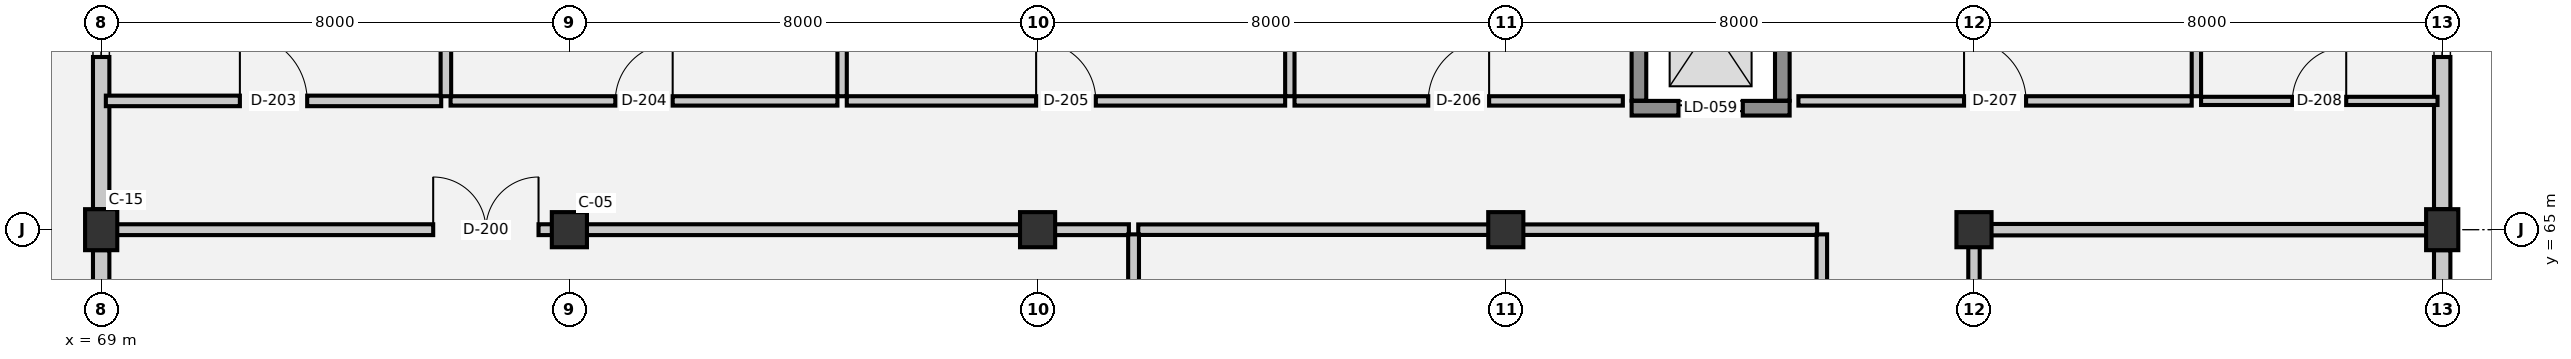
"""IFC4 building model, lengths in metres.
Left out: names, types, materials, properties, quantities, classifications, styles, units other than length and angle.
Written with IfcOpenShell. Run it as: python <this file> out.ifc"""

import sys

from ifc_helpers import new_model, si_unit, direction, frame, frame_2d, origin, origin_2d, place, context, subcontext, project, spatial, rectangle, extrude, element, fill, save


model = new_model("IFC4")
c1 = context("Model", 3, precision=1e-05, world=origin(), true_north=direction((0.0, 1.0)))
c2 = subcontext(c1, "Body", "Model", "MODEL_VIEW")
j1 = project(units=[si_unit("LENGTHUNIT", "METRE"), si_unit("PLANEANGLEUNIT", "RADIAN")], contexts=[c1])
p1 = place(None, origin())
s1 = spatial("IfcSite", under=j1, at=p1, CompositionType="ELEMENT")
p2 = place(p1, origin())
s2 = spatial("IfcBuilding", under=s1, at=p2, CompositionType="ELEMENT")
p3 = place(p2, frame((0.0, 0.0, 33.3)))
s3 = spatial("IfcBuildingStorey", under=s2, at=p3, CompositionType="ELEMENT", Elevation=33.3)
p4 = place(p3, frame((69.0, 65.0, 0.0), z_axis=(0.0, 0.0, 1.0), x_axis=(1.0, 0.0, 0.0)))
e1 = element("IfcColumn", 1, at=p4, inside=s3, PredefinedType="COLUMN", context=c2, shape_type="SweptSolid", body=[
    extrude(rectangle(XDim=0.55, YDim=0.7, at=origin_2d()), origin(), (0.0, 0.0, 1.0), 3.75),
])
for number, where, z_axis, x_axis in (
    (2, (77.0, 65.0, 0.0), (0.0, 0.0, 1.0), (1.0, 0.0, 0.0)),
    (3, (85.0, 65.0, 0.0), (0.0, 0.0, 1.0), (1.0, 0.0, 0.0)),
    (4, (93.0, 65.0, 0.0), (0.0, 0.0, 1.0), (1.0, 0.0, 0.0)),
    (5, (101.0, 65.0, 0.0), (0.0, 0.0, 1.0), (1.0, 0.0, 0.0)),
):
    element("IfcColumn", number, at=place(p3, frame(where, z_axis=z_axis, x_axis=x_axis)), inside=s3, PredefinedType="COLUMN", context=c2, shape_type="SweptSolid", body=[
        extrude(rectangle(XDim=0.6, YDim=0.6, at=origin_2d()), origin(), (0.0, 0.0, 1.0), 3.75),
    ])
p5 = place(p3, frame((109.0, 65.0, 0.0), z_axis=(0.0, 0.0, 1.0), x_axis=(1.0, 0.0, 0.0)))
e6 = element("IfcColumn", 6, at=p5, inside=s3, PredefinedType="COLUMN", context=c2, shape_type="SweptSolid", body=[
    extrude(rectangle(XDim=0.55, YDim=0.7, at=origin_2d()), origin(), (0.0, 0.0, 1.0), 3.75),
])
p6 = place(p3, frame((69.0, 51.35, 0.0), z_axis=(0.0, 0.0, 1.0), x_axis=(0.0, 1.0, 0.0)))
e7 = element("IfcWall", 7, at=p6, inside=s3, PredefinedType="SOLIDWALL", context=c2, shape_type="SweptSolid", body=[
    extrude(rectangle(XDim=13.3, YDim=0.28, at=frame_2d((6.65, 0.0))), origin(), (0.0, 0.0, 1.0), 2.6),
])
p7 = place(p6, frame((6.1, 0.0, 0.9)))
e8 = element("IfcOpeningElement", 8, at=p7, cuts=e7, PredefinedType="OPENING", context=c2, shape_type="SweptSolid", body=[
    extrude(rectangle(XDim=1.1, YDim=1.2, at=frame_2d((0.55, 0.6))), frame((0.0, 0.15, 0.0), z_axis=(0.0, -1.0, 0.0), x_axis=(1.0, 0.0, 0.0)), (0.0, 0.0, 1.0), 0.3),
])
p8 = place(p3, frame((69.0, 65.35, 0.0), z_axis=(0.0, 0.0, 1.0), x_axis=(0.0, 1.0, 0.0)))
e9 = element("IfcWall", 9, at=p8, inside=s3, PredefinedType="SOLIDWALL", context=c2, shape_type="SweptSolid", body=[
    extrude(rectangle(XDim=6.3, YDim=0.28, at=frame_2d((3.15, 0.0))), origin(), (0.0, 0.0, 1.0), 2.6),
])
p9 = place(p8, frame((2.6, 0.0, 0.9)))
e10 = element("IfcOpeningElement", 10, at=p9, cuts=e9, PredefinedType="OPENING", context=c2, shape_type="SweptSolid", body=[
    extrude(rectangle(XDim=1.1, YDim=1.2, at=frame_2d((0.55, 0.6))), frame((0.0, 0.15, 0.0), z_axis=(0.0, -1.0, 0.0), x_axis=(1.0, 0.0, 0.0)), (0.0, 0.0, 1.0), 0.3),
])
p10 = place(p3, frame((109.0, 71.65, 0.0), z_axis=(0.0, 0.0, 1.0), x_axis=(0.0, -1.0, 0.0)))
e11 = element("IfcWall", 11, at=p10, inside=s3, PredefinedType="SOLIDWALL", context=c2, shape_type="SweptSolid", body=[
    extrude(rectangle(XDim=6.3, YDim=0.28, at=frame_2d((3.15, 0.0))), origin(), (0.0, 0.0, 1.0), 2.6),
])
p11 = place(p10, frame((2.6, 0.0, 0.9)))
e12 = element("IfcOpeningElement", 12, at=p11, cuts=e11, PredefinedType="OPENING", context=c2, shape_type="SweptSolid", body=[
    extrude(rectangle(XDim=1.1, YDim=1.2, at=frame_2d((0.55, 0.6))), frame((0.0, 0.15, 0.0), z_axis=(0.0, -1.0, 0.0), x_axis=(1.0, 0.0, 0.0)), (0.0, 0.0, 1.0), 0.3),
])
p12 = place(p3, frame((109.0, 64.65, 0.0), z_axis=(0.0, 0.0, 1.0), x_axis=(0.0, -1.0, 0.0)))
e13 = element("IfcWall", 13, at=p12, inside=s3, PredefinedType="SOLIDWALL", context=c2, shape_type="SweptSolid", body=[
    extrude(rectangle(XDim=13.3, YDim=0.28, at=frame_2d((6.65, 0.0))), origin(), (0.0, 0.0, 1.0), 2.6),
])
p13 = place(p12, frame((6.1, 0.0, 0.9)))
e14 = element("IfcOpeningElement", 14, at=p13, cuts=e13, PredefinedType="OPENING", context=c2, shape_type="SweptSolid", body=[
    extrude(rectangle(XDim=1.1, YDim=1.2, at=frame_2d((0.55, 0.6))), frame((0.0, 0.15, 0.0), z_axis=(0.0, -1.0, 0.0), x_axis=(1.0, 0.0, 0.0)), (0.0, 0.0, 1.0), 0.3),
])
p14 = place(p3, frame((95.15, 67.075, 0.0), z_axis=(0.0, 0.0, 1.0), x_axis=(1.0, 0.0, 0.0)))
e15 = element("IfcWall", 15, at=p14, inside=s3, PredefinedType="SHEAR", context=c2, shape_type="SweptSolid", body=[
    extrude(rectangle(XDim=2.7, YDim=0.25, at=frame_2d((1.35, 0.0))), origin(), (0.0, 0.0, 1.0), 3.75),
])
p15 = place(p14, frame((0.8, 0.0, 0.0)))
e16 = element("IfcOpeningElement", 16, at=p15, cuts=e15, PredefinedType="OPENING", context=c2, shape_type="SweptSolid", body=[
    extrude(rectangle(XDim=1.1, YDim=2.15, at=frame_2d((0.55, 1.075))), frame((0.0, 0.135, 0.0), z_axis=(0.0, -1.0, 0.0), x_axis=(1.0, 0.0, 0.0)), (0.0, 0.0, 1.0), 0.27),
])
for number, where, z_axis, x_axis in (
    (17, (95.275, 69.795, 0.0), (0.0, 0.0, 1.0), (0.0, -1.0, 0.0)),
    (18, (97.725, 67.205, 0.0), (0.0, 0.0, 1.0), (0.0, 1.0, 0.0)),
):
    element("IfcWall", number, at=place(p3, frame(where, z_axis=z_axis, x_axis=x_axis)), inside=s3, PredefinedType="SHEAR", context=c2, shape_type="SweptSolid", body=[
        extrude(rectangle(XDim=2.59, YDim=0.25, at=frame_2d((1.295, 0.0))), origin(), (0.0, 0.0, 1.0), 3.75),
    ])
p16 = place(p3, frame((69.08, 65.0, 0.0), z_axis=(0.0, 0.0, 1.0), x_axis=(1.0, 0.0, 0.0)))
e19 = element("IfcWall", 19, at=p16, inside=s3, PredefinedType="PARTITIONING", context=c2, shape_type="SweptSolid", body=[
    extrude(rectangle(XDim=17.48, YDim=0.185, at=frame_2d((8.74, 0.0))), origin(), (0.0, 0.0, 1.0), 2.82),
])
p17 = place(p16, frame((5.593, 0.0, 0.0)))
e20 = element("IfcOpeningElement", 20, at=p17, cuts=e19, PredefinedType="OPENING", context=c2, shape_type="SweptSolid", body=[
    extrude(rectangle(XDim=1.8, YDim=2.3, at=frame_2d((0.9, 1.15))), frame((0.0, 0.103, 0.0), z_axis=(0.0, -1.0, 0.0), x_axis=(1.0, 0.0, 0.0)), (0.0, 0.0, 1.0), 0.205),
])
p18 = place(p3, frame((86.72, 65.0, 0.0), z_axis=(0.0, 0.0, 1.0), x_axis=(1.0, 0.0, 0.0)))
e21 = element("IfcWall", 21, at=p18, inside=s3, PredefinedType="PARTITIONING", context=c2, shape_type="SweptSolid", body=[
    extrude(rectangle(XDim=11.6, YDim=0.18, at=frame_2d((5.8, 0.0))), origin(), (0.0, 0.0, 1.0), 2.82),
])
p19 = place(p3, frame((101.08, 65.0, 0.0), z_axis=(0.0, 0.0, 1.0), x_axis=(1.0, 0.0, 0.0)))
e22 = element("IfcWall", 22, at=p19, inside=s3, PredefinedType="PARTITIONING", context=c2, shape_type="SweptSolid", body=[
    extrude(rectangle(XDim=7.84, YDim=0.195, at=frame_2d((3.92, 0.0))), origin(), (0.0, 0.0, 1.0), 2.82),
])
p20 = place(p3, frame((69.08, 67.2, 0.0), z_axis=(0.0, 0.0, 1.0), x_axis=(1.0, 0.0, 0.0)))
e23 = element("IfcWall", 23, at=p20, inside=s3, PredefinedType="PARTITIONING", context=c2, shape_type="SweptSolid", body=[
    extrude(rectangle(XDim=5.73, YDim=0.18, at=frame_2d((2.865, 0.0))), origin(), (0.0, 0.0, 1.0), 3.39),
])
p21 = place(p20, frame((2.29, 0.0, 0.0)))
e24 = element("IfcOpeningElement", 24, at=p21, cuts=e23, PredefinedType="OPENING", context=c2, shape_type="SweptSolid", body=[
    extrude(rectangle(XDim=1.15, YDim=2.2, at=frame_2d((0.575, 1.1))), frame((0.0, 0.1, 0.0), z_axis=(0.0, -1.0, 0.0), x_axis=(1.0, 0.0, 0.0)), (0.0, 0.0, 1.0), 0.2),
])
p22 = place(p3, frame((74.97, 67.2, 0.0), z_axis=(0.0, 0.0, 1.0), x_axis=(1.0, 0.0, 0.0)))
e25 = element("IfcWall", 25, at=p22, inside=s3, PredefinedType="PARTITIONING", context=c2, shape_type="SweptSolid", body=[
    extrude(rectangle(XDim=6.61, YDim=0.16, at=frame_2d((3.305, 0.0))), origin(), (0.0, 0.0, 1.0), 3.39),
])
p23 = place(p22, frame((2.815, 0.0, 0.0)))
e26 = element("IfcOpeningElement", 26, at=p23, cuts=e25, PredefinedType="OPENING", context=c2, shape_type="SweptSolid", body=[
    extrude(rectangle(XDim=0.98, YDim=2.1, at=frame_2d((0.49, 1.05))), frame((0.0, 0.09, 0.0), z_axis=(0.0, -1.0, 0.0), x_axis=(1.0, 0.0, 0.0)), (0.0, 0.0, 1.0), 0.18),
])
p24 = place(p3, frame((81.74, 67.2, 0.0), z_axis=(0.0, 0.0, 1.0), x_axis=(1.0, 0.0, 0.0)))
e27 = element("IfcWall", 27, at=p24, inside=s3, PredefinedType="PARTITIONING", context=c2, shape_type="SweptSolid", body=[
    extrude(rectangle(XDim=7.49, YDim=0.16, at=frame_2d((3.745, 0.0))), origin(), (0.0, 0.0, 1.0), 3.39),
])
p25 = place(p24, frame((3.235, 0.0, 0.0)))
e28 = element("IfcOpeningElement", 28, at=p25, cuts=e27, PredefinedType="OPENING", context=c2, shape_type="SweptSolid", body=[
    extrude(rectangle(XDim=1.02, YDim=2.15, at=frame_2d((0.51, 1.075))), frame((0.0, 0.09, 0.0), z_axis=(0.0, -1.0, 0.0), x_axis=(1.0, 0.0, 0.0)), (0.0, 0.0, 1.0), 0.18),
])
p26 = place(p3, frame((89.39, 67.2, 0.0), z_axis=(0.0, 0.0, 1.0), x_axis=(1.0, 0.0, 0.0)))
e29 = element("IfcWall", 29, at=p26, inside=s3, PredefinedType="PARTITIONING", context=c2, shape_type="SweptSolid", body=[
    extrude(rectangle(XDim=5.61, YDim=0.16, at=frame_2d((2.805, 0.0))), origin(), (0.0, 0.0, 1.0), 3.39),
])
p27 = place(p26, frame((2.285, 0.0, 0.0)))
e30 = element("IfcOpeningElement", 30, at=p27, cuts=e29, PredefinedType="OPENING", context=c2, shape_type="SweptSolid", body=[
    extrude(rectangle(XDim=1.04, YDim=2.15, at=frame_2d((0.52, 1.075))), frame((0.0, 0.09, 0.0), z_axis=(0.0, -1.0, 0.0), x_axis=(1.0, 0.0, 0.0)), (0.0, 0.0, 1.0), 0.18),
])
p28 = place(p3, frame((98.0, 67.2, 0.0), z_axis=(0.0, 0.0, 1.0), x_axis=(1.0, 0.0, 0.0)))
e31 = element("IfcWall", 31, at=p28, inside=s3, PredefinedType="PARTITIONING", context=c2, shape_type="SweptSolid", body=[
    extrude(rectangle(XDim=6.72, YDim=0.16, at=frame_2d((3.36, 0.0))), origin(), (0.0, 0.0, 1.0), 3.39),
])
p29 = place(p28, frame((2.83, 0.0, 0.0)))
e32 = element("IfcOpeningElement", 32, at=p29, cuts=e31, PredefinedType="OPENING", context=c2, shape_type="SweptSolid", body=[
    extrude(rectangle(XDim=1.06, YDim=2.2, at=frame_2d((0.53, 1.1))), frame((0.0, 0.09, 0.0), z_axis=(0.0, -1.0, 0.0), x_axis=(1.0, 0.0, 0.0)), (0.0, 0.0, 1.0), 0.18),
])
p30 = place(p3, frame((104.88, 67.2, 0.0), z_axis=(0.0, 0.0, 1.0), x_axis=(1.0, 0.0, 0.0)))
e33 = element("IfcWall", 33, at=p30, inside=s3, PredefinedType="PLUMBINGWALL", context=c2, shape_type="SweptSolid", body=[
    extrude(rectangle(XDim=4.04, YDim=0.14, at=frame_2d((2.02, 0.0))), origin(), (0.0, 0.0, 1.0), 3.39),
])
p31 = place(p30, frame((1.56, 0.0, 0.0)))
e34 = element("IfcOpeningElement", 34, at=p31, cuts=e33, PredefinedType="OPENING", context=c2, shape_type="SweptSolid", body=[
    extrude(rectangle(XDim=0.92, YDim=2.1, at=frame_2d((0.46, 1.05))), frame((0.0, 0.08, 0.0), z_axis=(0.0, -1.0, 0.0), x_axis=(1.0, 0.0, 0.0)), (0.0, 0.0, 1.0), 0.16),
])
p32 = place(p3, frame((74.89, 67.28, 0.0), z_axis=(0.0, 0.0, 1.0), x_axis=(0.0, 1.0, 0.0)))
e35 = element("IfcWall", 35, at=p32, inside=s3, PredefinedType="PARTITIONING", context=c2, shape_type="SweptSolid", body=[
    extrude(rectangle(XDim=4.64, YDim=0.18, at=frame_2d((2.32, 0.0))), origin(), (0.0, 0.0, 1.0), 3.39),
])
p33 = place(p3, frame((81.66, 67.28, 0.0), z_axis=(0.0, 0.0, 1.0), x_axis=(0.0, 1.0, 0.0)))
e36 = element("IfcWall", 36, at=p33, inside=s3, PredefinedType="PARTITIONING", context=c2, shape_type="SweptSolid", body=[
    extrude(rectangle(XDim=4.64, YDim=0.16, at=frame_2d((2.32, 0.0))), origin(), (0.0, 0.0, 1.0), 3.39),
])
p34 = place(p3, frame((86.64, 51.08, 0.0), z_axis=(0.0, 0.0, 1.0), x_axis=(0.0, 1.0, 0.0)))
e37 = element("IfcWall", 37, at=p34, inside=s3, PredefinedType="PARTITIONING", context=c2, shape_type="SweptSolid", body=[
    extrude(rectangle(XDim=13.84, YDim=0.185, at=frame_2d((6.92, 0.0))), origin(), (0.0, 0.0, 1.0), 3.39),
])
p35 = place(p3, frame((89.31, 67.28, 0.0), z_axis=(0.0, 0.0, 1.0), x_axis=(0.0, 1.0, 0.0)))
e38 = element("IfcWall", 38, at=p35, inside=s3, PredefinedType="PARTITIONING", context=c2, shape_type="SweptSolid", body=[
    extrude(rectangle(XDim=4.64, YDim=0.16, at=frame_2d((2.32, 0.0))), origin(), (0.0, 0.0, 1.0), 3.39),
])
p36 = place(p3, frame((98.4, 51.08, 0.0), z_axis=(0.0, 0.0, 1.0), x_axis=(0.0, 1.0, 0.0)))
e39 = element("IfcWall", 39, at=p36, inside=s3, PredefinedType="PARTITIONING", context=c2, shape_type="SweptSolid", body=[
    extrude(rectangle(XDim=13.84, YDim=0.18, at=frame_2d((6.92, 0.0))), origin(), (0.0, 0.0, 1.0), 3.39),
])
p37 = place(p36, frame((6.345, 0.0, 0.0)))
e40 = element("IfcOpeningElement", 40, at=p37, cuts=e39, PredefinedType="OPENING", context=c2, shape_type="SweptSolid", body=[
    extrude(rectangle(XDim=1.15, YDim=2.2, at=frame_2d((0.575, 1.1))), frame((0.0, 0.1, 0.0), z_axis=(0.0, -1.0, 0.0), x_axis=(1.0, 0.0, 0.0)), (0.0, 0.0, 1.0), 0.2),
])
p38 = place(p3, frame((101.0, 51.08, 0.0), z_axis=(0.0, 0.0, 1.0), x_axis=(0.0, 1.0, 0.0)))
e41 = element("IfcWall", 41, at=p38, inside=s3, PredefinedType="PARTITIONING", context=c2, shape_type="SweptSolid", body=[
    extrude(rectangle(XDim=13.84, YDim=0.195, at=frame_2d((6.92, 0.0))), origin(), (0.0, 0.0, 1.0), 2.62),
])
p39 = place(p38, frame((6.02, 0.0, 0.0)))
e42 = element("IfcOpeningElement", 42, at=p39, cuts=e41, PredefinedType="OPENING", context=c2, shape_type="SweptSolid", body=[
    extrude(rectangle(XDim=1.8, YDim=2.3, at=frame_2d((0.9, 1.15))), frame((0.0, 0.107, 0.0), z_axis=(0.0, -1.0, 0.0), x_axis=(1.0, 0.0, 0.0)), (0.0, 0.0, 1.0), 0.215),
])
p40 = place(p3, frame((104.8, 67.28, 0.0), z_axis=(0.0, 0.0, 1.0), x_axis=(0.0, 1.0, 0.0)))
e43 = element("IfcWall", 43, at=p40, inside=s3, PredefinedType="PARTITIONING", context=c2, shape_type="SweptSolid", body=[
    extrude(rectangle(XDim=4.64, YDim=0.16, at=frame_2d((2.32, 0.0))), origin(), (0.0, 0.0, 1.0), 3.39),
])
p41 = place(p9, origin())
e44 = element("IfcWindow", 44, at=p41, inside=s3, PartitioningType="SINGLE_PANEL", PredefinedType="WINDOW", context=c2, shape_type="SweptSolid", body=[
    extrude(rectangle(XDim=1.1, YDim=1.2, at=frame_2d((0.55, 0.6))), frame((0.0, 0.03, 0.0), z_axis=(0.0, -1.0, 0.0), x_axis=(1.0, 0.0, 0.0)), (0.0, 0.0, 1.0), 0.06),
])
fill(e10, e44)
p42 = place(p11, origin())
e45 = element("IfcWindow", 45, at=p42, inside=s3, PartitioningType="SINGLE_PANEL", PredefinedType="WINDOW", context=c2, shape_type="SweptSolid", body=[
    extrude(rectangle(XDim=1.1, YDim=1.2, at=frame_2d((0.55, 0.6))), frame((0.0, 0.03, 0.0), z_axis=(0.0, -1.0, 0.0), x_axis=(1.0, 0.0, 0.0)), (0.0, 0.0, 1.0), 0.06),
])
fill(e12, e45)
p43 = place(p15, origin())
e46 = element("IfcDoor", 46, at=p43, inside=s3, OperationType="DOUBLE_DOOR_SLIDING", PredefinedType="DOOR", context=c2, shape_type="SweptSolid", body=[
    extrude(rectangle(XDim=1.1, YDim=2.15, at=frame_2d((0.55, 1.075))), frame((0.0, 0.025, 0.0), z_axis=(0.0, -1.0, 0.0), x_axis=(1.0, 0.0, 0.0)), (0.0, 0.0, 1.0), 0.05),
])
fill(e16, e46)
p44 = place(p17, origin())
e47 = element("IfcDoor", 47, at=p44, inside=s3, OperationType="DOUBLE_DOOR_SINGLE_SWING", PredefinedType="DOOR", context=c2, shape_type="SweptSolid", body=[
    extrude(rectangle(XDim=1.8, YDim=2.3, at=frame_2d((0.9, 1.15))), frame((0.0, 0.025, 0.0), z_axis=(0.0, -1.0, 0.0), x_axis=(1.0, 0.0, 0.0)), (0.0, 0.0, 1.0), 0.05),
])
fill(e20, e47)
p45 = place(p21, origin())
e48 = element("IfcDoor", 48, at=p45, inside=s3, OperationType="SINGLE_SWING_LEFT", PredefinedType="DOOR", context=c2, shape_type="SweptSolid", body=[
    extrude(rectangle(XDim=1.15, YDim=2.2, at=frame_2d((0.575, 1.1))), frame((0.0, 0.025, 0.0), z_axis=(0.0, -1.0, 0.0), x_axis=(1.0, 0.0, 0.0)), (0.0, 0.0, 1.0), 0.05),
])
fill(e24, e48)
p46 = place(p23, origin())
e49 = element("IfcDoor", 49, at=p46, inside=s3, OperationType="SINGLE_SWING_RIGHT", PredefinedType="DOOR", context=c2, shape_type="SweptSolid", body=[
    extrude(rectangle(XDim=0.98, YDim=2.1, at=frame_2d((0.49, 1.05))), frame((0.0, 0.025, 0.0), z_axis=(0.0, -1.0, 0.0), x_axis=(1.0, 0.0, 0.0)), (0.0, 0.0, 1.0), 0.05),
])
fill(e26, e49)
p47 = place(p25, origin())
e50 = element("IfcDoor", 50, at=p47, inside=s3, OperationType="SINGLE_SWING_LEFT", PredefinedType="DOOR", context=c2, shape_type="SweptSolid", body=[
    extrude(rectangle(XDim=1.02, YDim=2.15, at=frame_2d((0.51, 1.075))), frame((0.0, 0.025, 0.0), z_axis=(0.0, -1.0, 0.0), x_axis=(1.0, 0.0, 0.0)), (0.0, 0.0, 1.0), 0.05),
])
fill(e28, e50)
p48 = place(p27, origin())
e51 = element("IfcDoor", 51, at=p48, inside=s3, OperationType="SINGLE_SWING_RIGHT", PredefinedType="DOOR", context=c2, shape_type="SweptSolid", body=[
    extrude(rectangle(XDim=1.04, YDim=2.15, at=frame_2d((0.52, 1.075))), frame((0.0, 0.025, 0.0), z_axis=(0.0, -1.0, 0.0), x_axis=(1.0, 0.0, 0.0)), (0.0, 0.0, 1.0), 0.05),
])
fill(e30, e51)
p49 = place(p29, origin())
e52 = element("IfcDoor", 52, at=p49, inside=s3, OperationType="SINGLE_SWING_LEFT", PredefinedType="DOOR", context=c2, shape_type="SweptSolid", body=[
    extrude(rectangle(XDim=1.06, YDim=2.2, at=frame_2d((0.53, 1.1))), frame((0.0, 0.025, 0.0), z_axis=(0.0, -1.0, 0.0), x_axis=(1.0, 0.0, 0.0)), (0.0, 0.0, 1.0), 0.05),
])
fill(e32, e52)
p50 = place(p31, origin())
e53 = element("IfcDoor", 53, at=p50, inside=s3, OperationType="SINGLE_SWING_RIGHT", PredefinedType="DOOR", context=c2, shape_type="SweptSolid", body=[
    extrude(rectangle(XDim=0.92, YDim=2.1, at=frame_2d((0.46, 1.05))), frame((0.0, 0.025, 0.0), z_axis=(0.0, -1.0, 0.0), x_axis=(1.0, 0.0, 0.0)), (0.0, 0.0, 1.0), 0.05),
])
fill(e34, e53)
save(model, sys.argv[1])
